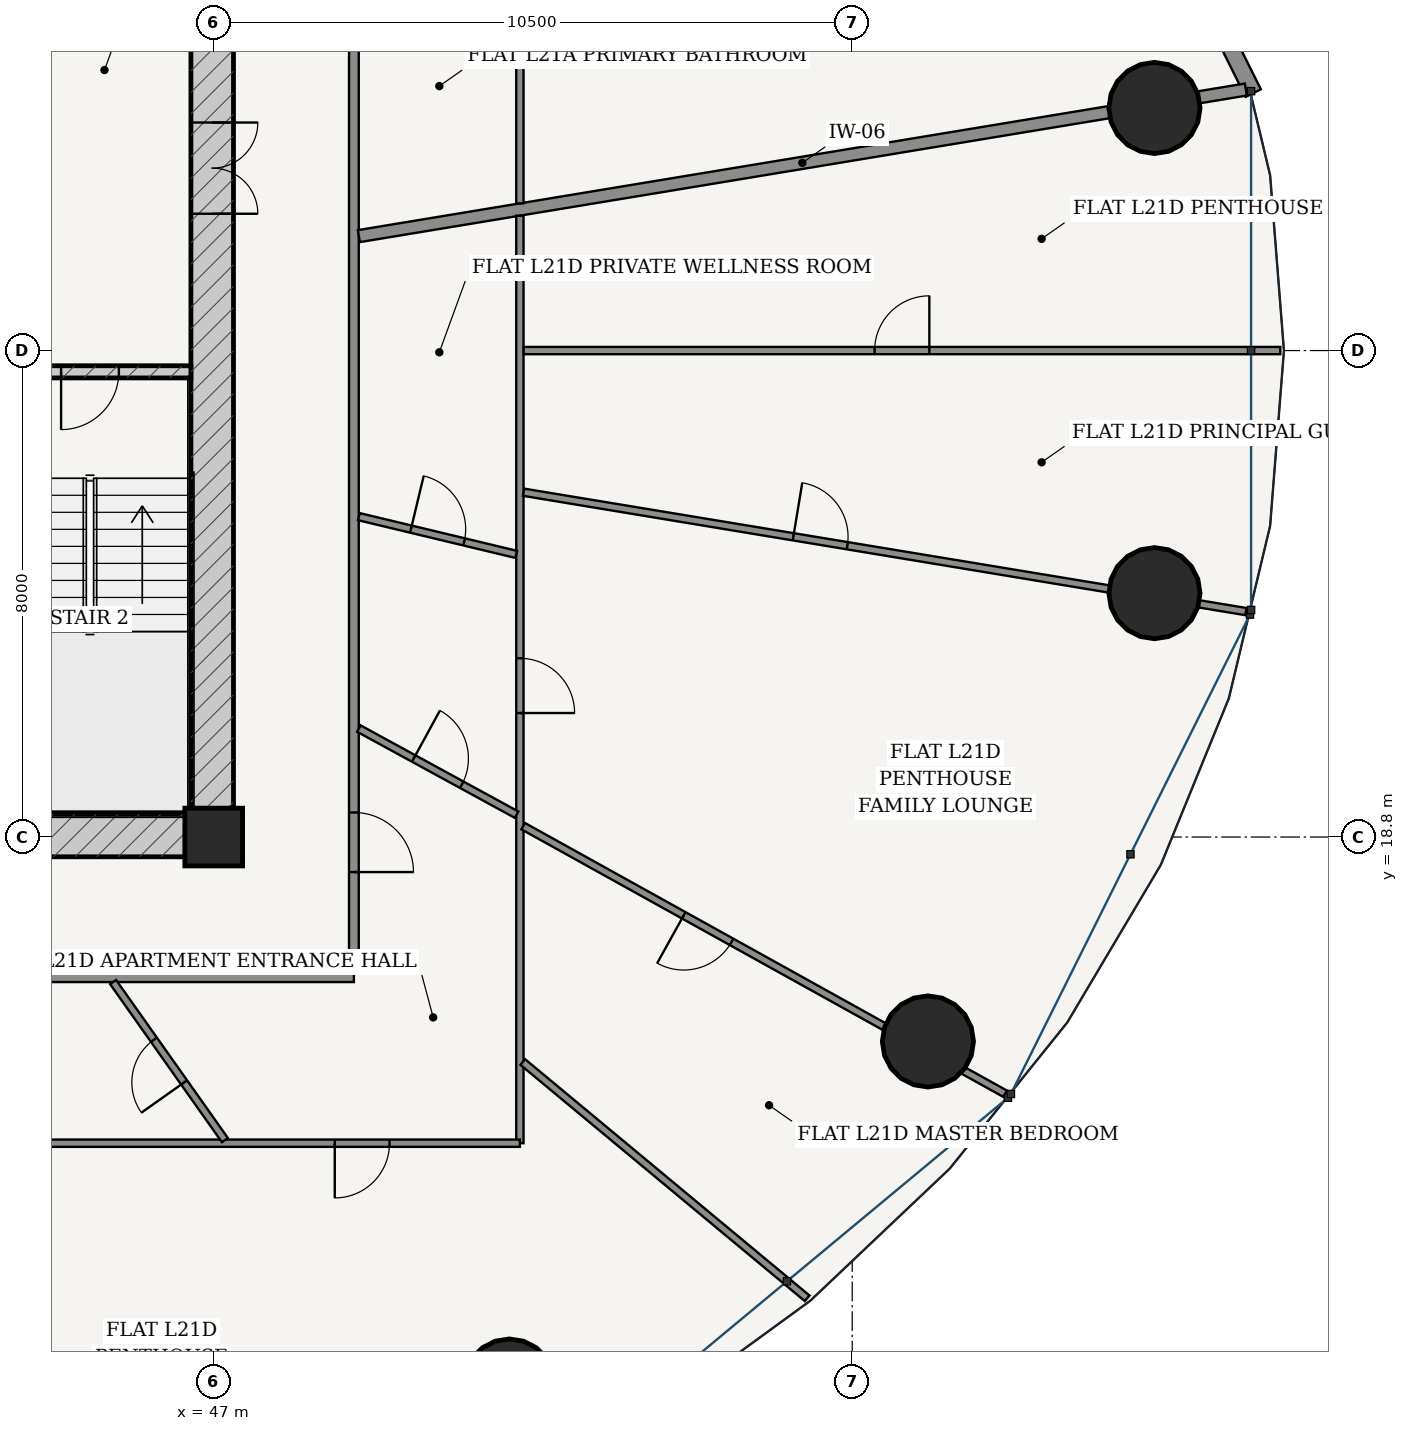
"""IFC4 building model, lengths in metres.
Left out: names, types, materials, properties, quantities, classifications, styles, units other than length and angle.
Written with IfcOpenShell. Run it as: python <this file> out.ifc"""

import sys

from ifc_helpers import new_model, si_unit, direction, frame, frame_2d, origin, origin_2d, place, context, subcontext, project, spatial, rectangle, hollow_circle, extrude, source, transform, mapped, element, fill, save


model = new_model("IFC4")
c1 = context("Model", 3, precision=1e-05, world=origin(), true_north=direction((-0.2419218956, 0.970295726276)))
c2 = subcontext(c1, "Body", "Model", "MODEL_VIEW")
j1 = project(units=[si_unit("LENGTHUNIT", "METRE"), si_unit("PLANEANGLEUNIT", "RADIAN")], contexts=[c1])
p1 = place(None, origin())
s1 = spatial("IfcSite", under=j1, at=p1, CompositionType="ELEMENT")
p2 = place(p1, origin())
s2 = spatial("IfcBuilding", under=s1, at=p2, CompositionType="ELEMENT")
p3 = place(p2, frame((0.0, 0.0, 83.4)))
s3 = spatial("IfcBuildingStorey", under=s2, at=p3, CompositionType="ELEMENT", Elevation=83.4)
p4 = place(p3, frame((47.0, 18.8, 0.0), z_axis=(0.0, 0.0, 1.0), x_axis=(1.0, 0.0, 0.0)))
e1 = element("IfcColumn", 1, at=p4, inside=s3, PredefinedType="COLUMN", context=c2, shape_type="SweptSolid", body=[
    extrude(rectangle(XDim=0.95, YDim=0.95, at=origin_2d()), origin(), (0.0, 0.0, 1.0), 3.6),
])
p5 = place(p3, frame((28.675, 18.825, 0.0), z_axis=(0.0, 0.0, 1.0), x_axis=(1.0, 0.0, 0.0)))
e2 = element("IfcWall", 2, at=p5, inside=s3, PredefinedType="SHEAR", context=c2, shape_type="SweptSolid", body=[
    extrude(rectangle(XDim=18.65, YDim=0.7, at=frame_2d((9.325, 0.0))), origin(), (0.0, 0.0, 1.0), 3.325),
])
p6 = place(p5, frame((7.577, 0.0, 0.0)))
e3 = element("IfcOpeningElement", 3, at=p6, cuts=e2, PredefinedType="OPENING", context=c2, shape_type="SweptSolid", body=[
    extrude(rectangle(XDim=0.85, YDim=2.1, at=frame_2d((0.425, 1.05))), frame((0.0, 0.36, 0.0), z_axis=(0.0, -1.0, 0.0), x_axis=(1.0, 0.0, 0.0)), (0.0, 0.0, 1.0), 0.72),
])
p7 = place(p5, frame((10.623, 0.0, 0.0)))
e4 = element("IfcOpeningElement", 4, at=p7, cuts=e2, PredefinedType="OPENING", context=c2, shape_type="SweptSolid", body=[
    extrude(rectangle(XDim=0.85, YDim=2.1, at=frame_2d((0.425, 1.05))), frame((0.0, 0.36, 0.0), z_axis=(0.0, -1.0, 0.0), x_axis=(1.0, 0.0, 0.0)), (0.0, 0.0, 1.0), 0.72),
])
p8 = place(p3, frame((46.975, 19.175, 0.0), z_axis=(0.0, 0.0, 1.0), x_axis=(0.0, 1.0, 0.0)))
e5 = element("IfcWall", 5, at=p8, inside=s3, PredefinedType="SHEAR", context=c2, shape_type="SweptSolid", body=[
    extrude(rectangle(XDim=15.25, YDim=0.7, at=frame_2d((7.625, 0.0))), origin(), (0.0, 0.0, 1.0), 3.325),
])
p9 = place(p8, frame((9.875, 0.0, 0.0)))
e6 = element("IfcOpeningElement", 6, at=p9, cuts=e5, PredefinedType="OPENING", context=c2, shape_type="SweptSolid", body=[
    extrude(rectangle(XDim=1.5, YDim=2.2, at=frame_2d((0.75, 1.1))), frame((0.0, 0.36, 0.0), z_axis=(0.0, -1.0, 0.0), x_axis=(1.0, 0.0, 0.0)), (0.0, 0.0, 1.0), 0.72),
])
p10 = place(p3, frame((43.305, 26.45, 0.0), z_axis=(0.0, 0.0, 1.0), x_axis=(1.0, 0.0, 0.0)))
e7 = element("IfcWall", 7, at=p10, inside=s3, PredefinedType="SOLIDWALL", context=c2, shape_type="SweptSolid", body=[
    extrude(rectangle(XDim=3.32, YDim=0.2, at=frame_2d((1.66, 0.0))), origin(), (0.0, 0.0, 1.0), 3.325),
])
p11 = place(p10, frame((1.185, 0.0, 0.0)))
e8 = element("IfcOpeningElement", 8, at=p11, cuts=e7, PredefinedType="OPENING", context=c2, shape_type="SweptSolid", body=[
    extrude(rectangle(XDim=0.95, YDim=2.15, at=frame_2d((0.475, 1.075))), frame((0.0, 0.11, 0.0), z_axis=(0.0, -1.0, 0.0), x_axis=(1.0, 0.0, 0.0)), (0.0, 0.0, 1.0), 0.22),
])
for number, where, z_axis, x_axis in (
    (9, (62.471, 30.79, 0.0), (0.0, 0.0, 1.0), (1.0, 0.0, 0.0)),
    (10, (51.862, 9.796, 0.0), (0.0, 0.0, 1.0), (1.0, 0.0, 0.0)),
    (11, (58.745, 15.438, 0.0), (0.0, 0.0, 1.0), (1.0, 0.0, 0.0)),
    (12, (62.471, 22.81, 0.0), (0.0, 0.0, 1.0), (1.0, 0.0, 0.0)),
):
    element("IfcColumn", number, at=place(p3, frame(where, z_axis=z_axis, x_axis=x_axis)), inside=s3, PredefinedType="COLUMN", context=c2, shape_type="SweptSolid", body=[
        extrude(hollow_circle(Radius=0.75, WallThickness=0.045, at=origin_2d()), origin(), (0.0, 0.0, 1.0), 3.6),
    ])
p12 = place(p3, frame((64.095, 31.034, 0.0), z_axis=(0.0, 0.0, 1.0), x_axis=(-0.446263788661, 0.894901464369, 0.0)))
e13 = element("IfcWall", 13, at=p12, inside=s3, PredefinedType="SOLIDWALL", context=c2, shape_type="SweptSolid", body=[
    extrude(rectangle(XDim=9.05, YDim=0.28, at=frame_2d((4.525, 0.0))), origin(), (0.0, 0.0, 1.0), 3.325),
])
p13 = place(p12, frame((1.394, 0.0, 0.85)))
e14 = element("IfcOpeningElement", 14, at=p13, cuts=e13, PredefinedType="OPENING", context=c2, shape_type="SweptSolid", body=[
    extrude(rectangle(XDim=2.1, YDim=1.95, at=frame_2d((1.05, 0.975))), frame((0.0, 0.15, 0.0), z_axis=(0.0, -1.0, 0.0), x_axis=(1.0, 0.0, 0.0)), (0.0, 0.0, 1.0), 0.3),
])
p14 = place(p12, frame((5.557, 0.0, 0.85)))
e15 = element("IfcOpeningElement", 15, at=p14, cuts=e13, PredefinedType="OPENING", context=c2, shape_type="SweptSolid", body=[
    extrude(rectangle(XDim=2.1, YDim=1.95, at=frame_2d((1.05, 0.975))), frame((0.0, 0.15, 0.0), z_axis=(0.0, -1.0, 0.0), x_axis=(1.0, 0.0, 0.0)), (0.0, 0.0, 1.0), 0.3),
])
p15 = place(p3, frame((26.695, 16.495, 0.0), z_axis=(0.0, 0.0, 1.0), x_axis=(1.0, 0.0, 0.0)))
e16 = element("IfcWall", 16, at=p15, inside=s3, PredefinedType="PARTITIONING", context=c2, shape_type="SweptSolid", body=[
    extrude(rectangle(XDim=22.61, YDim=0.16, at=frame_2d((11.305, 0.0))), origin(), (0.0, 0.0, 1.0), 2.767),
])
p16 = place(p3, frame((49.305, 16.575, 0.0), z_axis=(0.0, 0.0, 1.0), x_axis=(0.0, 1.0, 0.0)))
e17 = element("IfcWall", 17, at=p16, inside=s3, PredefinedType="PARTITIONING", context=c2, shape_type="SweptSolid", body=[
    extrude(rectangle(XDim=20.45, YDim=0.16, at=frame_2d((10.225, 0.0))), origin(), (0.0, 0.0, 1.0), 2.767),
])
p17 = place(p16, frame((1.649, 0.0, 0.0)))
e18 = element("IfcOpeningElement", 18, at=p17, cuts=e17, PredefinedType="OPENING", context=c2, shape_type="SweptSolid", body=[
    extrude(rectangle(XDim=0.98, YDim=2.2, at=frame_2d((0.49, 1.1))), frame((0.0, 0.09, 0.0), z_axis=(0.0, -1.0, 0.0), x_axis=(1.0, 0.0, 0.0)), (0.0, 0.0, 1.0), 0.18),
])
p18 = place(p3, frame((49.387, 28.682, 0.0), z_axis=(0.0, 0.0, 1.0), x_axis=(0.986617934215, 0.163049231479, 0.0)))
e19 = element("IfcWall", 19, at=p18, inside=s3, PredefinedType="PARTITIONING", context=c2, shape_type="SweptSolid", body=[
    extrude(rectangle(XDim=14.785, YDim=0.2, at=frame_2d((7.392, 0.0))), origin(), (0.0, 0.0, 1.0), 2.767),
])
p19 = place(p3, frame((52.035, 39.835, 0.0), z_axis=(0.0, 0.0, 1.0), x_axis=(0.0, -1.0, 0.0)))
e20 = element("IfcWall", 20, at=p19, inside=s3, PredefinedType="PARTITIONING", context=c2, shape_type="SweptSolid", body=[
    extrude(rectangle(XDim=10.614, YDim=0.12, at=frame_2d((5.307, 0.0))), origin(), (0.0, 0.0, 1.0), 2.767),
])
p20 = place(p19, frame((2.107, 0.0, 0.0)))
e21 = element("IfcOpeningElement", 21, at=p20, cuts=e20, PredefinedType="OPENING", context=c2, shape_type="SweptSolid", body=[
    extrude(rectangle(XDim=0.9, YDim=2.15, at=frame_2d((0.45, 1.075))), frame((0.0, 0.07, 0.0), z_axis=(0.0, -1.0, 0.0), x_axis=(1.0, 0.0, 0.0)), (0.0, 0.0, 1.0), 0.14),
])
p21 = place(p3, frame((52.035, 29.017, 0.0), z_axis=(0.0, 0.0, 1.0), x_axis=(0.0, -1.0, 0.0)))
e22 = element("IfcWall", 22, at=p21, inside=s3, PredefinedType="PARTITIONING", context=c2, shape_type="SweptSolid", body=[
    extrude(rectangle(XDim=15.252, YDim=0.12, at=frame_2d((7.626, 0.0))), origin(), (0.0, 0.0, 1.0), 2.767),
])
p22 = place(p21, frame((7.278, 0.0, 0.0)))
e23 = element("IfcOpeningElement", 23, at=p22, cuts=e22, PredefinedType="OPENING", context=c2, shape_type="SweptSolid", body=[
    extrude(rectangle(XDim=0.9, YDim=2.15, at=frame_2d((0.45, 1.075))), frame((0.0, 0.07, 0.0), z_axis=(0.0, -1.0, 0.0), x_axis=(1.0, 0.0, 0.0)), (0.0, 0.0, 1.0), 0.14),
])
p23 = place(p3, frame((52.035, 13.765, 0.0), z_axis=(0.0, 0.0, 1.0), x_axis=(-1.0, 0.0, 0.0)))
e24 = element("IfcWall", 24, at=p23, inside=s3, PredefinedType="PARTITIONING", context=c2, shape_type="SweptSolid", body=[
    extrude(rectangle(XDim=10.812, YDim=0.12, at=frame_2d((5.406, 0.0))), origin(), (0.0, 0.0, 1.0), 2.767),
])
p24 = place(p23, frame((2.145, 0.0, 0.0)))
e25 = element("IfcOpeningElement", 25, at=p24, cuts=e24, PredefinedType="OPENING", context=c2, shape_type="SweptSolid", body=[
    extrude(rectangle(XDim=0.9, YDim=2.15, at=frame_2d((0.45, 1.075))), frame((0.0, 0.07, 0.0), z_axis=(0.0, -1.0, 0.0), x_axis=(1.0, 0.0, 0.0)), (0.0, 0.0, 1.0), 0.14),
])
p25 = place(p3, frame((52.083, 15.1, 0.0), z_axis=(0.0, 0.0, 1.0), x_axis=(0.769161827891, -0.63905405289, 0.0)))
e26 = element("IfcWall", 26, at=p25, inside=s3, PredefinedType="PARTITIONING", context=c2, shape_type="SweptSolid", body=[
    extrude(rectangle(XDim=6.08, YDim=0.12, at=frame_2d((3.04, 0.0))), origin(), (0.0, 0.0, 1.0), 2.767),
])
p26 = place(p3, frame((52.089, 18.979, 0.0), z_axis=(0.0, 0.0, 1.0), x_axis=(0.874313476423, -0.485361664066, 0.0)))
e27 = element("IfcWall", 27, at=p26, inside=s3, PredefinedType="PARTITIONING", context=c2, shape_type="SweptSolid", body=[
    extrude(rectangle(XDim=9.066, YDim=0.12, at=frame_2d((4.533, 0.0))), origin(), (0.0, 0.0, 1.0), 2.767),
])
p27 = place(p26, frame((3.02, 0.0, 0.0)))
e28 = element("IfcOpeningElement", 28, at=p27, cuts=e27, PredefinedType="OPENING", context=c2, shape_type="SweptSolid", body=[
    extrude(rectangle(XDim=0.9, YDim=2.15, at=frame_2d((0.45, 1.075))), frame((0.0, 0.07, 0.0), z_axis=(0.0, -1.0, 0.0), x_axis=(1.0, 0.0, 0.0)), (0.0, 0.0, 1.0), 0.14),
])
p28 = place(p3, frame((52.096, 24.47, 0.0), z_axis=(0.0, 0.0, 1.0), x_axis=(0.986618264768, -0.163047231274, 0.0)))
e29 = element("IfcWall", 29, at=p28, inside=s3, PredefinedType="PARTITIONING", context=c2, shape_type="SweptSolid", body=[
    extrude(rectangle(XDim=12.039, YDim=0.12, at=frame_2d((6.02, 0.0))), origin(), (0.0, 0.0, 1.0), 2.767),
])
p29 = place(p28, frame((4.496, 0.0, 0.0)))
e30 = element("IfcOpeningElement", 30, at=p29, cuts=e29, PredefinedType="OPENING", context=c2, shape_type="SweptSolid", body=[
    extrude(rectangle(XDim=0.9, YDim=2.15, at=frame_2d((0.45, 1.075))), frame((0.0, 0.07, 0.0), z_axis=(0.0, -1.0, 0.0), x_axis=(1.0, 0.0, 0.0)), (0.0, 0.0, 1.0), 0.14),
])
p30 = place(p3, frame((52.097, 26.8, 0.0), z_axis=(0.0, 0.0, 1.0), x_axis=(1.0, 0.0, 0.0)))
e31 = element("IfcWall", 31, at=p30, inside=s3, PredefinedType="PARTITIONING", context=c2, shape_type="SweptSolid", body=[
    extrude(rectangle(XDim=12.443, YDim=0.12, at=frame_2d((6.222, 0.0))), origin(), (0.0, 0.0, 1.0), 2.767),
])
p31 = place(p30, frame((5.771, 0.0, 0.0)))
e32 = element("IfcOpeningElement", 32, at=p31, cuts=e31, PredefinedType="OPENING", context=c2, shape_type="SweptSolid", body=[
    extrude(rectangle(XDim=0.9, YDim=2.15, at=frame_2d((0.45, 1.075))), frame((0.0, 0.07, 0.0), z_axis=(0.0, -1.0, 0.0), x_axis=(1.0, 0.0, 0.0)), (0.0, 0.0, 1.0), 0.14),
])
p32 = place(p3, frame((45.345, 16.415, 0.0), z_axis=(0.0, 0.0, 1.0), x_axis=(0.577474693199, -0.816408585645, 0.0)))
e33 = element("IfcWall", 33, at=p32, inside=s3, PredefinedType="PARTITIONING", context=c2, shape_type="SweptSolid", body=[
    extrude(rectangle(XDim=3.184, YDim=0.12, at=frame_2d((1.592, 0.0))), origin(), (0.0, 0.0, 1.0), 3.004),
])
p33 = place(p32, frame((1.162, 0.0, 0.0)))
e34 = element("IfcOpeningElement", 34, at=p33, cuts=e33, PredefinedType="OPENING", context=c2, shape_type="SweptSolid", body=[
    extrude(rectangle(XDim=0.86, YDim=2.15, at=frame_2d((0.43, 1.075))), frame((0.0, 0.07, 0.0), z_axis=(0.0, -1.0, 0.0), x_axis=(1.0, 0.0, 0.0)), (0.0, 0.0, 1.0), 0.14),
])
p34 = place(p3, frame((49.387, 20.583, 0.0), z_axis=(0.0, 0.0, 1.0), x_axis=(0.877718703033, -0.479176249773, 0.0)))
e35 = element("IfcWall", 35, at=p34, inside=s3, PredefinedType="PARTITIONING", context=c2, shape_type="SweptSolid", body=[
    extrude(rectangle(XDim=2.955, YDim=0.12, at=frame_2d((1.478, 0.0))), origin(), (0.0, 0.0, 1.0), 2.767),
])
p35 = place(p34, frame((1.028, 0.0, 0.0)))
e36 = element("IfcOpeningElement", 36, at=p35, cuts=e35, PredefinedType="OPENING", context=c2, shape_type="SweptSolid", body=[
    extrude(rectangle(XDim=0.9, YDim=2.15, at=frame_2d((0.45, 1.075))), frame((0.0, 0.07, 0.0), z_axis=(0.0, -1.0, 0.0), x_axis=(1.0, 0.0, 0.0)), (0.0, 0.0, 1.0), 0.14),
])
p36 = place(p3, frame((49.387, 24.069, 0.0), z_axis=(0.0, 0.0, 1.0), x_axis=(0.972423933179, -0.233220269661, 0.0)))
e37 = element("IfcWall", 37, at=p36, inside=s3, PredefinedType="PARTITIONING", context=c2, shape_type="SweptSolid", body=[
    extrude(rectangle(XDim=2.661, YDim=0.12, at=frame_2d((1.331, 0.0))), origin(), (0.0, 0.0, 1.0), 3.325),
])
p37 = place(p36, frame((0.881, 0.0, 0.0)))
e38 = element("IfcOpeningElement", 38, at=p37, cuts=e37, PredefinedType="OPENING", context=c2, shape_type="SweptSolid", body=[
    extrude(rectangle(XDim=0.9, YDim=2.15, at=frame_2d((0.45, 1.075))), frame((0.0, 0.07, 0.0), z_axis=(0.0, -1.0, 0.0), x_axis=(1.0, 0.0, 0.0)), (0.0, 0.0, 1.0), 0.14),
])
m1 = source(origin(), c2, "Body", "SweptSolid", [
    extrude(rectangle(XDim=1.5, YDim=2.2, at=frame_2d((0.75, 1.1))), frame((0.0, 0.025, 0.0), z_axis=(0.0, -1.0, 0.0), x_axis=(1.0, 0.0, 0.0)), (0.0, 0.0, 1.0), 0.05),
])
p38 = place(p9, frame((1.5, 0.0, 0.0), z_axis=(0.0, 0.0, 1.0), x_axis=(-1.0, 0.0, 0.0)))
e39 = element("IfcDoor", 39, at=p38, inside=s3, OperationType="DOUBLE_DOOR_SINGLE_SWING", PredefinedType="DOOR", context=c2, shape_type="MappedRepresentation", body=[
    mapped(m1, transform((0.0, 0.0, 0.0), scale=1.0)),
])
fill(e6, e39)
m2 = source(origin(), c2, "Body", "SweptSolid", [
    extrude(rectangle(XDim=0.95, YDim=2.15, at=frame_2d((0.475, 1.075))), frame((0.0, 0.025, 0.0), z_axis=(0.0, -1.0, 0.0), x_axis=(1.0, 0.0, 0.0)), (0.0, 0.0, 1.0), 0.05),
])
p39 = place(p11, frame((0.95, 0.0, 0.0), z_axis=(0.0, 0.0, 1.0), x_axis=(-1.0, 0.0, 0.0)))
e40 = element("IfcDoor", 40, at=p39, inside=s3, OperationType="SINGLE_SWING_RIGHT", PredefinedType="DOOR", context=c2, shape_type="MappedRepresentation", body=[
    mapped(m2, transform((0.0, 0.0, 0.0), scale=1.0)),
])
fill(e8, e40)
m3 = source(origin(), c2, "Body", "SweptSolid", [
    extrude(rectangle(XDim=0.98, YDim=2.2, at=frame_2d((0.49, 1.1))), frame((0.0, 0.025, 0.0), z_axis=(0.0, -1.0, 0.0), x_axis=(1.0, 0.0, 0.0)), (0.0, 0.0, 1.0), 0.05),
])
p40 = place(p17, frame((0.98, 0.0, 0.0), z_axis=(0.0, 0.0, 1.0), x_axis=(-1.0, 0.0, 0.0)))
e41 = element("IfcDoor", 41, at=p40, inside=s3, OperationType="SINGLE_SWING_RIGHT", PredefinedType="DOOR", context=c2, shape_type="MappedRepresentation", body=[
    mapped(m3, transform((0.0, 0.0, 0.0), scale=1.0)),
])
fill(e18, e41)
m4 = source(origin(), c2, "Body", "SweptSolid", [
    extrude(rectangle(XDim=0.86, YDim=2.15, at=frame_2d((0.43, 1.075))), frame((0.0, 0.025, 0.0), z_axis=(0.0, -1.0, 0.0), x_axis=(1.0, 0.0, 0.0)), (0.0, 0.0, 1.0), 0.05),
])
p41 = place(p33, frame((0.86, 0.0, 0.0), z_axis=(0.0, 0.0, 1.0), x_axis=(-1.0, 0.0, 0.0)))
e42 = element("IfcDoor", 42, at=p41, inside=s3, OperationType="SINGLE_SWING_LEFT", PredefinedType="DOOR", context=c2, shape_type="MappedRepresentation", body=[
    mapped(m4, transform((0.0, 0.0, 0.0), scale=1.0)),
])
fill(e34, e42)
m5 = source(origin(), c2, "Body", "SweptSolid", [
    extrude(rectangle(XDim=0.9, YDim=2.15, at=frame_2d((0.45, 1.075))), frame((0.0, 0.025, 0.0), z_axis=(0.0, -1.0, 0.0), x_axis=(1.0, 0.0, 0.0)), (0.0, 0.0, 1.0), 0.05),
])
p42 = place(p24, origin())
e43 = element("IfcDoor", 43, at=p42, inside=s3, OperationType="SINGLE_SWING_RIGHT", PredefinedType="DOOR", context=c2, shape_type="MappedRepresentation", body=[
    mapped(m5, transform((0.0, 0.0, 0.0), scale=1.0)),
])
fill(e25, e43)
p43 = place(p35, origin())
e44 = element("IfcDoor", 44, at=p43, inside=s3, OperationType="SINGLE_SWING_LEFT", PredefinedType="DOOR", context=c2, shape_type="MappedRepresentation", body=[
    mapped(m5, transform((0.0, 0.0, 0.0), scale=1.0)),
])
fill(e36, e44)
p44 = place(p22, origin())
e45 = element("IfcDoor", 45, at=p44, inside=s3, OperationType="SINGLE_SWING_RIGHT", PredefinedType="DOOR", context=c2, shape_type="MappedRepresentation", body=[
    mapped(m5, transform((0.0, 0.0, 0.0), scale=1.0)),
])
fill(e23, e45)
p45 = place(p37, origin())
e46 = element("IfcDoor", 46, at=p45, inside=s3, OperationType="SINGLE_SWING_LEFT", PredefinedType="DOOR", context=c2, shape_type="MappedRepresentation", body=[
    mapped(m5, transform((0.0, 0.0, 0.0), scale=1.0)),
])
fill(e38, e46)
p46 = place(p27, frame((0.9, 0.0, 0.0), z_axis=(0.0, 0.0, 1.0), x_axis=(-1.0, 0.0, 0.0)))
e47 = element("IfcDoor", 47, at=p46, inside=s3, OperationType="SINGLE_SWING_RIGHT", PredefinedType="DOOR", context=c2, shape_type="MappedRepresentation", body=[
    mapped(m5, transform((0.0, 0.0, 0.0), scale=1.0)),
])
fill(e28, e47)
p47 = place(p29, origin())
e48 = element("IfcDoor", 48, at=p47, inside=s3, OperationType="SINGLE_SWING_LEFT", PredefinedType="DOOR", context=c2, shape_type="MappedRepresentation", body=[
    mapped(m5, transform((0.0, 0.0, 0.0), scale=1.0)),
])
fill(e30, e48)
p48 = place(p31, origin())
e49 = element("IfcDoor", 49, at=p48, inside=s3, OperationType="SINGLE_SWING_RIGHT", PredefinedType="DOOR", context=c2, shape_type="MappedRepresentation", body=[
    mapped(m5, transform((0.0, 0.0, 0.0), scale=1.0)),
])
fill(e32, e49)
save(model, sys.argv[1])
